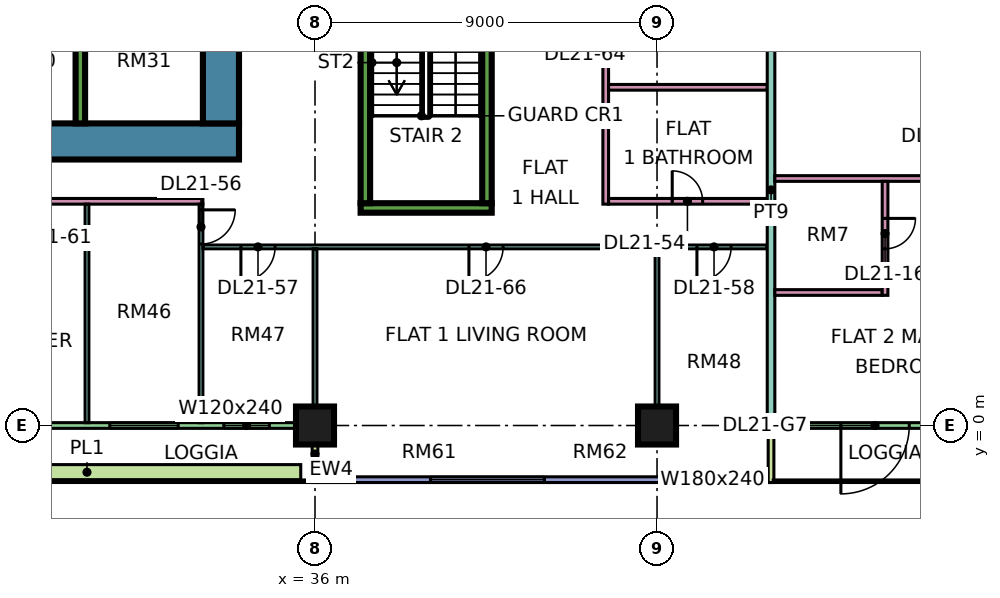
"""IFC4 building model, lengths in metres.
Left out: names, types, materials, properties, quantities, classifications, styles, units other than length and angle.
Written with IfcOpenShell. Run it as: python <this file> out.ifc"""

import sys

from ifc_helpers import new_model, si_unit, direction, frame, frame_2d, origin, origin_2d, place, context, subcontext, project, spatial, rectangle, extrude, element, fill, save


model = new_model("IFC4")
c1 = context("Model", 3, precision=1e-05, world=origin(), true_north=direction((0.0, 1.0)))
c2 = subcontext(c1, "Body", "Model", "MODEL_VIEW")
j1 = project(units=[si_unit("LENGTHUNIT", "METRE"), si_unit("PLANEANGLEUNIT", "RADIAN")], contexts=[c1])
p1 = place(None, origin())
s1 = spatial("IfcSite", under=j1, at=p1, CompositionType="ELEMENT")
p2 = place(p1, origin())
s2 = spatial("IfcBuilding", under=s1, at=p2, CompositionType="ELEMENT")
p3 = place(p2, frame((0.0, 0.0, 95.65)))
s3 = spatial("IfcBuildingStorey", under=s2, at=p3, CompositionType="ELEMENT", Elevation=95.65)
for number, where, z_axis, x_axis in (
    (1, (36.0, 0.0, 0.0), (0.0, 0.0, 1.0), (1.0, 0.0, 0.0)),
    (2, (45.0, 0.0, 0.0), (0.0, 0.0, 1.0), (1.0, 0.0, 0.0)),
):
    element("IfcColumn", number, at=place(p3, frame(where, z_axis=z_axis, x_axis=x_axis)), inside=s3, PredefinedType="COLUMN", context=c2, shape_type="SweptSolid", body=[
        extrude(rectangle(XDim=1.0, YDim=1.0, at=origin_2d()), origin(), (0.0, 0.0, 1.0), 3.75),
    ])
p4 = place(p3, frame((9.0, 7.475, 0.0), z_axis=(0.0, 0.0, 1.0), x_axis=(1.0, 0.0, 0.0)))
e3 = element("IfcWall", 3, at=p4, inside=s3, PredefinedType="SHEAR", context=c2, shape_type="SweptSolid", body=[
    extrude(rectangle(XDim=25.0, YDim=0.95, at=frame_2d((12.5, 0.0))), origin(), (0.0, 0.0, 1.0), 3.75),
])
p5 = place(p3, frame((33.525, 7.95, 0.0), z_axis=(0.0, 0.0, 1.0), x_axis=(0.0, 1.0, 0.0)))
e4 = element("IfcWall", 4, at=p5, inside=s3, PredefinedType="SHEAR", context=c2, shape_type="SweptSolid", body=[
    extrude(rectangle(XDim=11.1, YDim=0.95, at=frame_2d((5.55, 0.0))), origin(), (0.0, 0.0, 1.0), 3.75),
])
p6 = place(p5, frame((5.25, 0.0, 0.0)))
e5 = element("IfcOpeningElement", 5, at=p6, cuts=e4, PredefinedType="OPENING", context=c2, shape_type="SweptSolid", body=[
    extrude(rectangle(XDim=1.8, YDim=2.4, at=frame_2d((0.9, 1.2))), frame((0.0, 0.485, 0.0), z_axis=(0.0, -1.0, 0.0), x_axis=(1.0, 0.0, 0.0)), (0.0, 0.0, 1.0), 0.97),
])
p7 = place(p3, frame((29.825, 7.95, 0.0), z_axis=(0.0, 0.0, 1.0), x_axis=(0.0, 1.0, 0.0)))
e6 = element("IfcWall", 6, at=p7, inside=s3, PredefinedType="SHEAR", context=c2, shape_type="SweptSolid", body=[
    extrude(rectangle(XDim=3.25, YDim=0.25, at=frame_2d((1.625, 0.0))), origin(), (0.0, 0.0, 1.0), 3.75),
])
p8 = place(p3, frame((37.2, 5.725, 0.0), z_axis=(0.0, 0.0, 1.0), x_axis=(1.0, 0.0, 0.0)))
e7 = element("IfcWall", 7, at=p8, inside=s3, PredefinedType="SHEAR", context=c2, shape_type="SweptSolid", body=[
    extrude(rectangle(XDim=3.45, YDim=0.25, at=frame_2d((1.725, 0.0))), origin(), (0.0, 0.0, 1.0), 3.75),
])
for number, where, z_axis, x_axis in (
    (8, (37.325, 5.85, 0.0), (0.0, 0.0, 1.0), (0.0, 1.0, 0.0)),
    (9, (40.525, 5.85, 0.0), (0.0, 0.0, 1.0), (0.0, 1.0, 0.0)),
):
    element("IfcWall", number, at=place(p3, frame(where, z_axis=z_axis, x_axis=x_axis)), inside=s3, PredefinedType="SHEAR", context=c2, shape_type="SweptSolid", body=[
        extrude(rectangle(XDim=6.5, YDim=0.25, at=frame_2d((3.25, 0.0))), origin(), (0.0, 0.0, 1.0), 3.75),
    ])
p9 = place(p3, frame((24.075, 0.0, 0.0), z_axis=(0.0, 0.0, 1.0), x_axis=(1.0, 0.0, 0.0)))
e10 = element("IfcWall", 10, at=p9, inside=s3, PredefinedType="SOLIDWALL", context=c2, shape_type="SweptSolid", body=[
    extrude(rectangle(XDim=11.85, YDim=0.15, at=frame_2d((5.925, 0.0))), origin(), (0.0, 0.0, 1.0), 3.35),
])
p10 = place(p9, frame((2.325, 0.0, 0.0)))
e11 = element("IfcOpeningElement", 11, at=p10, cuts=e10, PredefinedType="OPENING", context=c2, shape_type="SweptSolid", body=[
    extrude(rectangle(XDim=1.8, YDim=2.4, at=frame_2d((0.9, 1.2))), frame((0.0, 0.085, 0.0), z_axis=(0.0, -1.0, 0.0), x_axis=(1.0, 0.0, 0.0)), (0.0, 0.0, 1.0), 0.17),
])
p11 = place(p9, frame((6.525, 0.0, 0.45)))
e12 = element("IfcOpeningElement", 12, at=p11, cuts=e10, PredefinedType="OPENING", context=c2, shape_type="SweptSolid", body=[
    extrude(rectangle(XDim=1.8, YDim=2.4, at=frame_2d((0.9, 1.2))), frame((0.0, 0.085, 0.0), z_axis=(0.0, -1.0, 0.0), x_axis=(1.0, 0.0, 0.0)), (0.0, 0.0, 1.0), 0.17),
])
p12 = place(p9, frame((9.525, 0.0, 0.45)))
e13 = element("IfcOpeningElement", 13, at=p12, cuts=e10, PredefinedType="OPENING", context=c2, shape_type="SweptSolid", body=[
    extrude(rectangle(XDim=1.2, YDim=2.4, at=frame_2d((0.6, 1.2))), frame((0.0, 0.085, 0.0), z_axis=(0.0, -1.0, 0.0), x_axis=(1.0, 0.0, 0.0)), (0.0, 0.0, 1.0), 0.17),
])
p13 = place(p3, frame((36.0, -1.5, 0.0), z_axis=(0.0, 0.0, 1.0), x_axis=(0.0, 1.0, 0.0)))
e14 = element("IfcWall", 14, at=p13, inside=s3, PredefinedType="SOLIDWALL", context=c2, shape_type="SweptSolid", body=[
    extrude(rectangle(XDim=1.5, YDim=0.15, at=frame_2d((0.75, 0.0))), origin(), (0.0, 0.0, 1.0), 3.35),
])
p14 = place(p3, frame((36.075, -1.425, 0.0), z_axis=(0.0, 0.0, 1.0), x_axis=(1.0, 0.0, 0.0)))
e15 = element("IfcWall", 15, at=p14, inside=s3, PredefinedType="SOLIDWALL", context=c2, shape_type="SweptSolid", body=[
    extrude(rectangle(XDim=11.85, YDim=0.15, at=frame_2d((5.925, 0.0))), origin(), (0.0, 0.0, 1.0), 3.35),
])
p15 = place(p14, frame((2.962, 0.0, 0.45)))
e16 = element("IfcOpeningElement", 16, at=p15, cuts=e15, PredefinedType="OPENING", context=c2, shape_type="SweptSolid", body=[
    extrude(rectangle(XDim=3.0, YDim=2.4, at=frame_2d((1.5, 1.2))), frame((0.0, 0.085, 0.0), z_axis=(0.0, -1.0, 0.0), x_axis=(1.0, 0.0, 0.0)), (0.0, 0.0, 1.0), 0.17),
])
p16 = place(p14, frame((9.488, 0.0, 0.45)))
e17 = element("IfcOpeningElement", 17, at=p16, cuts=e15, PredefinedType="OPENING", context=c2, shape_type="SweptSolid", body=[
    extrude(rectangle(XDim=1.8, YDim=2.4, at=frame_2d((0.9, 1.2))), frame((0.0, 0.085, 0.0), z_axis=(0.0, -1.0, 0.0), x_axis=(1.0, 0.0, 0.0)), (0.0, 0.0, 1.0), 0.17),
])
p17 = place(p3, frame((48.075, 0.0, 0.0), z_axis=(0.0, 0.0, 1.0), x_axis=(1.0, 0.0, 0.0)))
e18 = element("IfcWall", 18, at=p17, inside=s3, PredefinedType="SOLIDWALL", context=c2, shape_type="SweptSolid", body=[
    extrude(rectangle(XDim=11.85, YDim=0.15, at=frame_2d((5.925, 0.0))), origin(), (0.0, 0.0, 1.0), 3.35),
])
p18 = place(p17, frame((1.762, 0.0, 0.0)))
e19 = element("IfcOpeningElement", 19, at=p18, cuts=e18, PredefinedType="OPENING", context=c2, shape_type="SweptSolid", body=[
    extrude(rectangle(XDim=1.8, YDim=2.4, at=frame_2d((0.9, 1.2))), frame((0.0, 0.085, 0.0), z_axis=(0.0, -1.0, 0.0), x_axis=(1.0, 0.0, 0.0)), (0.0, 0.0, 1.0), 0.17),
])
p19 = place(p17, frame((7.688, 0.0, 0.45)))
e20 = element("IfcOpeningElement", 20, at=p19, cuts=e18, PredefinedType="OPENING", context=c2, shape_type="SweptSolid", body=[
    extrude(rectangle(XDim=3.0, YDim=2.4, at=frame_2d((1.5, 1.2))), frame((0.0, 0.085, 0.0), z_axis=(0.0, -1.0, 0.0), x_axis=(1.0, 0.0, 0.0)), (0.0, 0.0, 1.0), 0.17),
])
p20 = place(p3, frame((48.0, -1.5, 0.0), z_axis=(0.0, 0.0, 1.0), x_axis=(0.0, 1.0, 0.0)))
e21 = element("IfcWall", 21, at=p20, inside=s3, PredefinedType="SOLIDWALL", context=c2, shape_type="SweptSolid", body=[
    extrude(rectangle(XDim=1.5, YDim=0.15, at=frame_2d((0.75, 0.0))), origin(), (0.0, 0.0, 1.0), 3.35),
])
p21 = place(p3, frame((24.375, -1.229, 0.0), z_axis=(0.0, 0.0, 1.0), x_axis=(1.0, 0.0, 0.0)))
e22 = element("IfcWall", 22, at=p21, inside=s3, PredefinedType="SOLIDWALL", context=c2, shape_type="SweptSolid", body=[
    extrude(rectangle(XDim=11.25, YDim=0.4, at=frame_2d((5.625, 0.0))), origin(), (0.0, 0.0, 1.0), 0.7),
])
p22 = place(p3, frame((11.95, 5.9, 0.0), z_axis=(0.0, 0.0, 1.0), x_axis=(1.0, 0.0, 0.0)))
e23 = element("IfcWall", 23, at=p22, inside=s3, PredefinedType="PARTITIONING", context=c2, shape_type="SweptSolid", body=[
    extrude(rectangle(XDim=21.1, YDim=0.15, at=frame_2d((10.55, 0.0))), origin(), (0.0, 0.0, 1.0), 3.35),
])
p23 = place(p22, frame((10.1, 0.0, 0.0)))
e24 = element("IfcOpeningElement", 24, at=p23, cuts=e23, PredefinedType="OPENING", context=c2, shape_type="SweptSolid", body=[
    extrude(rectangle(XDim=0.9, YDim=2.1, at=frame_2d((0.45, 1.05))), frame((0.0, 0.085, 0.0), z_axis=(0.0, -1.0, 0.0), x_axis=(1.0, 0.0, 0.0)), (0.0, 0.0, 1.0), 0.17),
])
p24 = place(p22, frame((16.1, 0.0, 0.0)))
e25 = element("IfcOpeningElement", 25, at=p24, cuts=e23, PredefinedType="OPENING", context=c2, shape_type="SweptSolid", body=[
    extrude(rectangle(XDim=0.9, YDim=2.1, at=frame_2d((0.45, 1.05))), frame((0.0, 0.085, 0.0), z_axis=(0.0, -1.0, 0.0), x_axis=(1.0, 0.0, 0.0)), (0.0, 0.0, 1.0), 0.17),
])
p25 = place(p22, frame((4.1, 0.0, 0.0)))
e26 = element("IfcOpeningElement", 26, at=p25, cuts=e23, PredefinedType="OPENING", context=c2, shape_type="SweptSolid", body=[
    extrude(rectangle(XDim=0.9, YDim=2.1, at=frame_2d((0.45, 1.05))), frame((0.0, 0.085, 0.0), z_axis=(0.0, -1.0, 0.0), x_axis=(1.0, 0.0, 0.0)), (0.0, 0.0, 1.0), 0.17),
])
p26 = place(p3, frame((30.0, 0.074, 0.0), z_axis=(0.0, 0.0, 1.0), x_axis=(0.0, 1.0, 0.0)))
e27 = element("IfcWall", 27, at=p26, inside=s3, PredefinedType="PARTITIONING", context=c2, shape_type="SweptSolid", body=[
    extrude(rectangle(XDim=5.751, YDim=0.1, at=frame_2d((2.875, 0.0))), origin(), (0.0, 0.0, 1.0), 3.35),
])
p27 = place(p3, frame((33.0, 0.074, 0.0), z_axis=(0.0, 0.0, 1.0), x_axis=(0.0, 1.0, 0.0)))
e28 = element("IfcWall", 28, at=p27, inside=s3, PredefinedType="PARTITIONING", context=c2, shape_type="SweptSolid", body=[
    extrude(rectangle(XDim=5.751, YDim=0.1, at=frame_2d((2.875, 0.0))), origin(), (0.0, 0.0, 1.0), 3.35),
])
p28 = place(p27, frame((4.701, 0.0, 0.0)))
e29 = element("IfcOpeningElement", 29, at=p28, cuts=e28, PredefinedType="OPENING", context=c2, shape_type="SweptSolid", body=[
    extrude(rectangle(XDim=0.9, YDim=2.1, at=frame_2d((0.45, 1.05))), frame((0.0, 0.06, 0.0), z_axis=(0.0, -1.0, 0.0), x_axis=(1.0, 0.0, 0.0)), (0.0, 0.0, 1.0), 0.12),
])
p29 = place(p3, frame((33.05, 4.7, 0.0), z_axis=(0.0, 0.0, 1.0), x_axis=(1.0, 0.0, 0.0)))
e30 = element("IfcWall", 30, at=p29, inside=s3, PredefinedType="PARTITIONING", context=c2, shape_type="SweptSolid", body=[
    extrude(rectangle(XDim=14.85, YDim=0.1, at=frame_2d((7.425, 0.0))), origin(), (0.0, 0.0, 1.0), 3.35),
])
p30 = place(p29, frame((1.0, 0.0, 0.0)))
e31 = element("IfcOpeningElement", 31, at=p30, cuts=e30, PredefinedType="OPENING", context=c2, shape_type="SweptSolid", body=[
    extrude(rectangle(XDim=0.9, YDim=2.1, at=frame_2d((0.45, 1.05))), frame((0.0, 0.06, 0.0), z_axis=(0.0, -1.0, 0.0), x_axis=(1.0, 0.0, 0.0)), (0.0, 0.0, 1.0), 0.12),
])
p31 = place(p29, frame((13.0, 0.0, 0.0)))
e32 = element("IfcOpeningElement", 32, at=p31, cuts=e30, PredefinedType="OPENING", context=c2, shape_type="SweptSolid", body=[
    extrude(rectangle(XDim=0.9, YDim=2.1, at=frame_2d((0.45, 1.05))), frame((0.0, 0.06, 0.0), z_axis=(0.0, -1.0, 0.0), x_axis=(1.0, 0.0, 0.0)), (0.0, 0.0, 1.0), 0.12),
])
p32 = place(p29, frame((7.0, 0.0, 0.0)))
e33 = element("IfcOpeningElement", 33, at=p32, cuts=e30, PredefinedType="OPENING", context=c2, shape_type="SweptSolid", body=[
    extrude(rectangle(XDim=0.9, YDim=2.1, at=frame_2d((0.45, 1.05))), frame((0.0, 0.06, 0.0), z_axis=(0.0, -1.0, 0.0), x_axis=(1.0, 0.0, 0.0)), (0.0, 0.0, 1.0), 0.12),
])
p33 = place(p3, frame((36.0, 0.0, 0.0), z_axis=(0.0, 0.0, 1.0), x_axis=(0.0, 1.0, 0.0)))
e34 = element("IfcWall", 34, at=p33, inside=s3, PredefinedType="PARTITIONING", context=c2, shape_type="SweptSolid", body=[
    extrude(rectangle(XDim=4.65, YDim=0.1, at=frame_2d((2.325, 0.0))), origin(), (0.0, 0.0, 1.0), 3.35),
])
p34 = place(p3, frame((43.65, 5.825, 0.0), z_axis=(0.0, 0.0, 1.0), x_axis=(0.0, 1.0, 0.0)))
e35 = element("IfcWall", 35, at=p34, inside=s3, PredefinedType="PARTITIONING", context=c2, shape_type="SweptSolid", body=[
    extrude(rectangle(XDim=6.575, YDim=0.15, at=frame_2d((3.288, 0.0))), origin(), (0.0, 0.0, 1.0), 3.35),
])
p35 = place(p34, frame((4.425, 0.0, 0.0)))
e36 = element("IfcOpeningElement", 36, at=p35, cuts=e35, PredefinedType="OPENING", context=c2, shape_type="SweptSolid", body=[
    extrude(rectangle(XDim=0.9, YDim=2.1, at=frame_2d((0.45, 1.05))), frame((0.0, 0.085, 0.0), z_axis=(0.0, -1.0, 0.0), x_axis=(1.0, 0.0, 0.0)), (0.0, 0.0, 1.0), 0.17),
])
p36 = place(p3, frame((43.725, 5.9, 0.0), z_axis=(0.0, 0.0, 1.0), x_axis=(1.0, 0.0, 0.0)))
e37 = element("IfcWall", 37, at=p36, inside=s3, PredefinedType="PARTITIONING", context=c2, shape_type="SweptSolid", body=[
    extrude(rectangle(XDim=4.175, YDim=0.15, at=frame_2d((2.087, 0.0))), origin(), (0.0, 0.0, 1.0), 3.35),
])
p37 = place(p36, frame((1.675, 0.0, 0.0)))
e38 = element("IfcOpeningElement", 38, at=p37, cuts=e37, PredefinedType="OPENING", context=c2, shape_type="SweptSolid", body=[
    extrude(rectangle(XDim=0.8, YDim=2.1, at=frame_2d((0.4, 1.05))), frame((0.0, 0.085, 0.0), z_axis=(0.0, -1.0, 0.0), x_axis=(1.0, 0.0, 0.0)), (0.0, 0.0, 1.0), 0.17),
])
p38 = place(p3, frame((43.725, 8.9, 0.0), z_axis=(0.0, 0.0, 1.0), x_axis=(1.0, 0.0, 0.0)))
e39 = element("IfcWall", 39, at=p38, inside=s3, PredefinedType="PARTITIONING", context=c2, shape_type="SweptSolid", body=[
    extrude(rectangle(XDim=4.175, YDim=0.15, at=frame_2d((2.087, 0.0))), origin(), (0.0, 0.0, 1.0), 3.35),
])
p39 = place(p3, frame((45.0, 0.0, 0.0), z_axis=(0.0, 0.0, 1.0), x_axis=(0.0, 1.0, 0.0)))
e40 = element("IfcWall", 40, at=p39, inside=s3, PredefinedType="PARTITIONING", context=c2, shape_type="SweptSolid", body=[
    extrude(rectangle(XDim=4.65, YDim=0.1, at=frame_2d((2.325, 0.0))), origin(), (0.0, 0.0, 1.0), 3.35),
])
p40 = place(p3, frame((48.0, 0.0, 0.0), z_axis=(0.0, 0.0, 1.0), x_axis=(0.0, 1.0, 0.0)))
e41 = element("IfcWall", 41, at=p40, inside=s3, PredefinedType="PARTITIONING", context=c2, shape_type="SweptSolid", body=[
    extrude(rectangle(XDim=12.4, YDim=0.2, at=frame_2d((6.2, 0.0))), origin(), (0.0, 0.0, 1.0), 3.35),
])
p41 = place(p3, frame((48.1, 3.5, 0.0), z_axis=(0.0, 0.0, 1.0), x_axis=(1.0, 0.0, 0.0)))
e42 = element("IfcWall", 42, at=p41, inside=s3, PredefinedType="PARTITIONING", context=c2, shape_type="SweptSolid", body=[
    extrude(rectangle(XDim=2.825, YDim=0.15, at=frame_2d((1.413, 0.0))), origin(), (0.0, 0.0, 1.0), 3.35),
])
p42 = place(p3, frame((48.1, 6.5, 0.0), z_axis=(0.0, 0.0, 1.0), x_axis=(1.0, 0.0, 0.0)))
e43 = element("IfcWall", 43, at=p42, inside=s3, PredefinedType="PARTITIONING", context=c2, shape_type="SweptSolid", body=[
    extrude(rectangle(XDim=5.95, YDim=0.15, at=frame_2d((2.975, 0.0))), origin(), (0.0, 0.0, 1.0), 3.35),
])
p43 = place(p42, frame((3.95, 0.0, 0.0)))
e44 = element("IfcOpeningElement", 44, at=p43, cuts=e43, PredefinedType="OPENING", context=c2, shape_type="SweptSolid", body=[
    extrude(rectangle(XDim=0.9, YDim=2.1, at=frame_2d((0.45, 1.05))), frame((0.0, 0.085, 0.0), z_axis=(0.0, -1.0, 0.0), x_axis=(1.0, 0.0, 0.0)), (0.0, 0.0, 1.0), 0.17),
])
p44 = place(p3, frame((51.0, 3.425, 0.0), z_axis=(0.0, 0.0, 1.0), x_axis=(0.0, 1.0, 0.0)))
e45 = element("IfcWall", 45, at=p44, inside=s3, PredefinedType="PARTITIONING", context=c2, shape_type="SweptSolid", body=[
    extrude(rectangle(XDim=3.0, YDim=0.15, at=frame_2d((1.5, 0.0))), origin(), (0.0, 0.0, 1.0), 3.35),
])
p45 = place(p44, frame((1.225, 0.0, 0.0)))
e46 = element("IfcOpeningElement", 46, at=p45, cuts=e45, PredefinedType="OPENING", context=c2, shape_type="SweptSolid", body=[
    extrude(rectangle(XDim=0.8, YDim=2.1, at=frame_2d((0.4, 1.05))), frame((0.0, 0.085, 0.0), z_axis=(0.0, -1.0, 0.0), x_axis=(1.0, 0.0, 0.0)), (0.0, 0.0, 1.0), 0.17),
])
p46 = place(p11, origin())
e47 = element("IfcWindow", 47, at=p46, inside=s3, PartitioningType="SINGLE_PANEL", PredefinedType="WINDOW", context=c2, shape_type="SweptSolid", body=[
    extrude(rectangle(XDim=1.8, YDim=2.4, at=frame_2d((0.9, 1.2))), frame((0.0, 0.03, 0.0), z_axis=(0.0, -1.0, 0.0), x_axis=(1.0, 0.0, 0.0)), (0.0, 0.0, 1.0), 0.06),
])
fill(e12, e47)
p47 = place(p12, origin())
e48 = element("IfcWindow", 48, at=p47, inside=s3, PartitioningType="SINGLE_PANEL", PredefinedType="WINDOW", context=c2, shape_type="SweptSolid", body=[
    extrude(rectangle(XDim=1.2, YDim=2.4, at=frame_2d((0.6, 1.2))), frame((0.0, 0.03, 0.0), z_axis=(0.0, -1.0, 0.0), x_axis=(1.0, 0.0, 0.0)), (0.0, 0.0, 1.0), 0.06),
])
fill(e13, e48)
p48 = place(p15, origin())
e49 = element("IfcWindow", 49, at=p48, inside=s3, PartitioningType="SINGLE_PANEL", PredefinedType="WINDOW", context=c2, shape_type="SweptSolid", body=[
    extrude(rectangle(XDim=3.0, YDim=2.4, at=frame_2d((1.5, 1.2))), frame((0.0, 0.03, 0.0), z_axis=(0.0, -1.0, 0.0), x_axis=(1.0, 0.0, 0.0)), (0.0, 0.0, 1.0), 0.06),
])
fill(e16, e49)
p49 = place(p16, origin())
e50 = element("IfcWindow", 50, at=p49, inside=s3, PartitioningType="SINGLE_PANEL", PredefinedType="WINDOW", context=c2, shape_type="SweptSolid", body=[
    extrude(rectangle(XDim=1.8, YDim=2.4, at=frame_2d((0.9, 1.2))), frame((0.0, 0.03, 0.0), z_axis=(0.0, -1.0, 0.0), x_axis=(1.0, 0.0, 0.0)), (0.0, 0.0, 1.0), 0.06),
])
fill(e17, e50)
p50 = place(p18, frame((1.8, 0.0, 0.0), z_axis=(0.0, 0.0, 1.0), x_axis=(-1.0, 0.0, 0.0)))
e51 = element("IfcDoor", 51, at=p50, inside=s3, OperationType="DOUBLE_DOOR_SINGLE_SWING", PredefinedType="DOOR", context=c2, shape_type="SweptSolid", body=[
    extrude(rectangle(XDim=1.8, YDim=2.4, at=frame_2d((0.9, 1.2))), frame((0.0, 0.025, 0.0), z_axis=(0.0, -1.0, 0.0), x_axis=(1.0, 0.0, 0.0)), (0.0, 0.0, 1.0), 0.05),
])
fill(e19, e51)
p51 = place(p45, origin())
e52 = element("IfcDoor", 52, at=p51, inside=s3, OperationType="SINGLE_SWING_RIGHT", PredefinedType="DOOR", context=c2, shape_type="SweptSolid", body=[
    extrude(rectangle(XDim=0.8, YDim=2.1, at=frame_2d((0.4, 1.05))), frame((0.0, 0.025, 0.0), z_axis=(0.0, -1.0, 0.0), x_axis=(1.0, 0.0, 0.0)), (0.0, 0.0, 1.0), 0.05),
])
fill(e46, e52)
p52 = place(p37, origin())
e53 = element("IfcDoor", 53, at=p52, inside=s3, OperationType="SINGLE_SWING_LEFT", PredefinedType="DOOR", context=c2, shape_type="SweptSolid", body=[
    extrude(rectangle(XDim=0.8, YDim=2.1, at=frame_2d((0.4, 1.05))), frame((0.0, 0.025, 0.0), z_axis=(0.0, -1.0, 0.0), x_axis=(1.0, 0.0, 0.0)), (0.0, 0.0, 1.0), 0.05),
])
fill(e38, e53)
p53 = place(p28, origin())
e54 = element("IfcDoor", 54, at=p53, inside=s3, OperationType="SINGLE_SWING_RIGHT", PredefinedType="DOOR", context=c2, shape_type="SweptSolid", body=[
    extrude(rectangle(XDim=0.9, YDim=2.1, at=frame_2d((0.45, 1.05))), frame((0.0, 0.025, 0.0), z_axis=(0.0, -1.0, 0.0), x_axis=(1.0, 0.0, 0.0)), (0.0, 0.0, 1.0), 0.05),
])
fill(e29, e54)
p54 = place(p30, frame((0.9, 0.0, 0.0), z_axis=(0.0, 0.0, 1.0), x_axis=(-1.0, 0.0, 0.0)))
e55 = element("IfcDoor", 55, at=p54, inside=s3, OperationType="SINGLE_SWING_LEFT", PredefinedType="DOOR", context=c2, shape_type="SweptSolid", body=[
    extrude(rectangle(XDim=0.9, YDim=2.1, at=frame_2d((0.45, 1.05))), frame((0.0, 0.025, 0.0), z_axis=(0.0, -1.0, 0.0), x_axis=(1.0, 0.0, 0.0)), (0.0, 0.0, 1.0), 0.05),
])
fill(e31, e55)
p55 = place(p31, frame((0.9, 0.0, 0.0), z_axis=(0.0, 0.0, 1.0), x_axis=(-1.0, 0.0, 0.0)))
e56 = element("IfcDoor", 56, at=p55, inside=s3, OperationType="SINGLE_SWING_LEFT", PredefinedType="DOOR", context=c2, shape_type="SweptSolid", body=[
    extrude(rectangle(XDim=0.9, YDim=2.1, at=frame_2d((0.45, 1.05))), frame((0.0, 0.025, 0.0), z_axis=(0.0, -1.0, 0.0), x_axis=(1.0, 0.0, 0.0)), (0.0, 0.0, 1.0), 0.05),
])
fill(e32, e56)
p56 = place(p32, frame((0.9, 0.0, 0.0), z_axis=(0.0, 0.0, 1.0), x_axis=(-1.0, 0.0, 0.0)))
e57 = element("IfcDoor", 57, at=p56, inside=s3, OperationType="SINGLE_SWING_LEFT", PredefinedType="DOOR", context=c2, shape_type="SweptSolid", body=[
    extrude(rectangle(XDim=0.9, YDim=2.1, at=frame_2d((0.45, 1.05))), frame((0.0, 0.025, 0.0), z_axis=(0.0, -1.0, 0.0), x_axis=(1.0, 0.0, 0.0)), (0.0, 0.0, 1.0), 0.05),
])
fill(e33, e57)
save(model, sys.argv[1])
